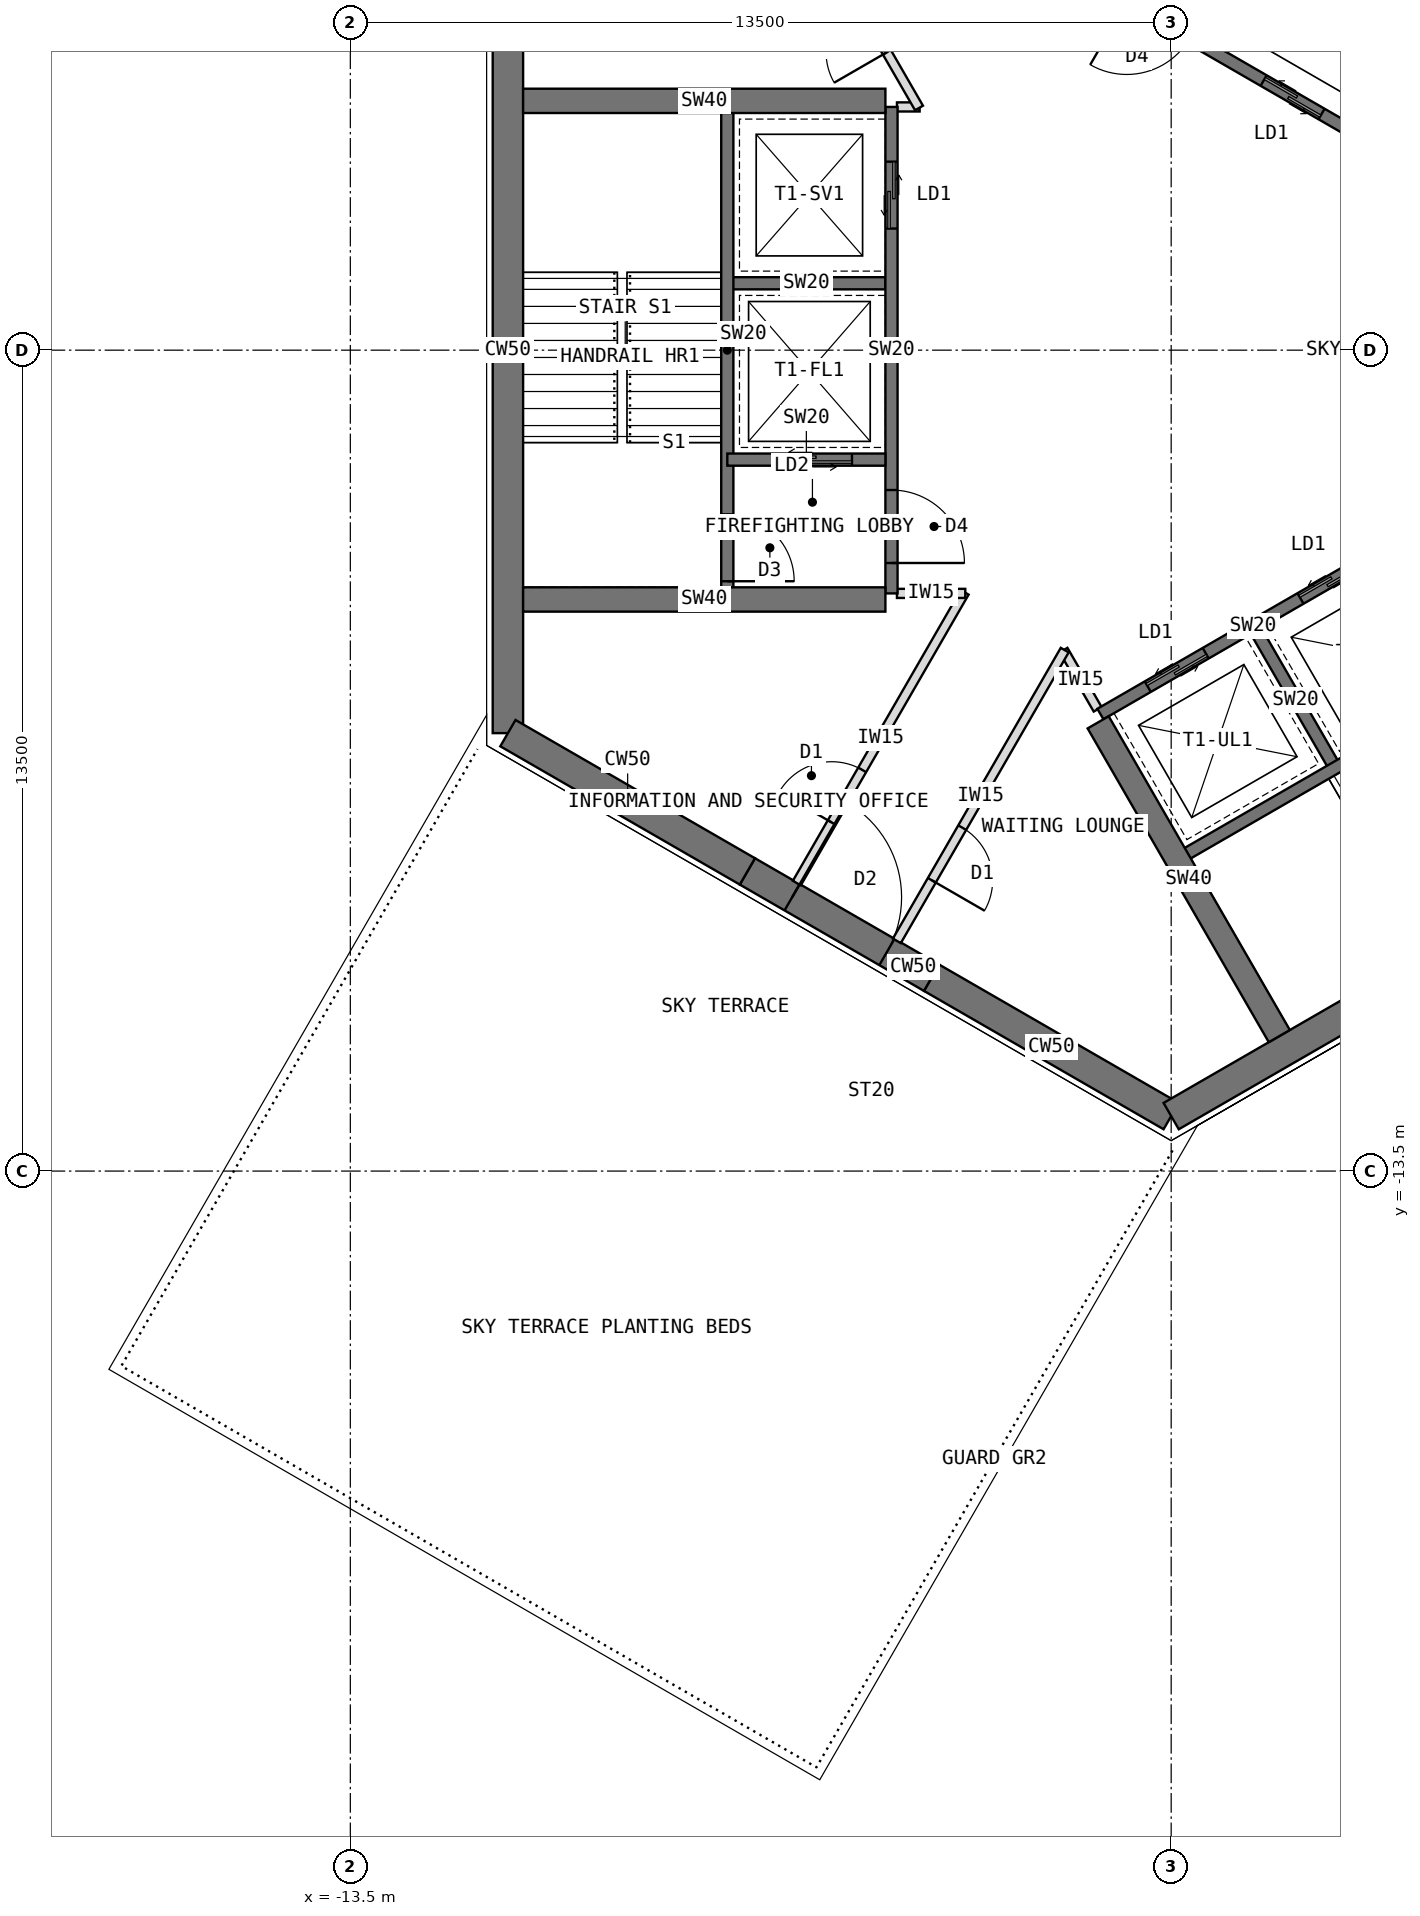
"""IFC4 building model, lengths in metres.
Left out: names, types, materials, properties, quantities, classifications, styles, units other than length and angle.
Written with IfcOpenShell. Run it as: python <this file> out.ifc"""

import sys

from ifc_helpers import new_model, si_unit, direction, frame, frame_2d, origin, place, context, subcontext, project, spatial, rectangle, extrude, element, fill, save


model = new_model("IFC4")
c1 = context("Model", 3, precision=1e-05, world=origin(), true_north=direction((0.0, 1.0)))
c2 = subcontext(c1, "Body", "Model", "MODEL_VIEW")
j1 = project(units=[si_unit("LENGTHUNIT", "METRE"), si_unit("PLANEANGLEUNIT", "RADIAN")], contexts=[c1])
p1 = place(None, origin())
s1 = spatial("IfcSite", under=j1, at=p1, CompositionType="ELEMENT")
p2 = place(p1, origin())
s2 = spatial("IfcBuilding", under=s1, at=p2, CompositionType="ELEMENT")
p3 = place(p2, frame((0.0, 0.0, 170.5)))
s3 = spatial("IfcBuildingStorey", under=s2, at=p3, CompositionType="ELEMENT", Elevation=170.5)
p4 = place(p3, frame((-10.908, 6.298, 0.0), z_axis=(0.0, 0.0, 1.0), x_axis=(0.0, -1.0, 0.0)))
e1 = element("IfcWall", 1, at=p4, inside=s3, PredefinedType="SHEAR", context=c2, shape_type="SweptSolid", body=[
    extrude(rectangle(XDim=12.596, YDim=0.5, at=frame_2d((6.298, 0.0))), origin(), (0.0, 0.0, 1.0), 4.0),
])
p5 = place(p3, frame((-10.908, -6.298, 0.0), z_axis=(0.0, 0.0, 1.0), x_axis=(0.866034513004, -0.499984222037, 0.0)))
e2 = element("IfcWall", 2, at=p5, inside=s3, PredefinedType="SHEAR", context=c2, shape_type="SweptSolid", body=[
    extrude(rectangle(XDim=4.548, YDim=0.5, at=frame_2d((2.274, 0.0))), origin(), (0.0, 0.0, 1.0), 4.0),
])
p6 = place(p3, frame((-6.97, -8.572, 0.0), z_axis=(0.0, 0.0, 1.0), x_axis=(0.866019471182, -0.500010275428, 0.0)))
e3 = element("IfcWall", 3, at=p6, inside=s3, PredefinedType="SHEAR", context=c2, shape_type="SweptSolid", body=[
    extrude(rectangle(XDim=3.5, YDim=0.5, at=frame_2d((1.75, 0.0))), origin(), (0.0, 0.0, 1.0), 4.0),
])
p7 = place(p6, frame((0.85, 0.0, 0.0)))
e4 = element("IfcOpeningElement", 4, at=p7, cuts=e3, PredefinedType="OPENING", context=c2, shape_type="SweptSolid", body=[
    extrude(rectangle(XDim=1.8, YDim=2.1, at=frame_2d((0.9, 1.05))), frame((0.0, 0.26, 0.0), z_axis=(0.0, -1.0, 0.0), x_axis=(1.0, 0.0, 0.0)), (0.0, 0.0, 1.0), 0.52),
])
p8 = place(p3, frame((-3.939, -10.322, 0.0), z_axis=(0.0, 0.0, 1.0), x_axis=(0.866011268655, -0.500024481964, 0.0)))
e5 = element("IfcWall", 5, at=p8, inside=s3, PredefinedType="SHEAR", context=c2, shape_type="SweptSolid", body=[
    extrude(rectangle(XDim=4.548, YDim=0.5, at=frame_2d((2.274, 0.0))), origin(), (0.0, 0.0, 1.0), 4.0),
])
p9 = place(p3, frame((0.0, -12.596, 0.0), z_axis=(0.0, 0.0, 1.0), x_axis=(0.866021940709, 0.500005998175, 0.0)))
e6 = element("IfcWall", 6, at=p9, inside=s3, PredefinedType="SHEAR", context=c2, shape_type="SweptSolid", body=[
    extrude(rectangle(XDim=12.596, YDim=0.5, at=frame_2d((6.298, 0.0))), origin(), (0.0, 0.0, 1.0), 4.0),
])
p10 = place(p3, frame((5.764, 1.984, 0.0), z_axis=(0.0, 0.0, 1.0), x_axis=(-0.866026010844, 0.49999894854, 0.0)))
e7 = element("IfcWall", 7, at=p10, inside=s3, PredefinedType="SHEAR", context=c2, shape_type="SweptSolid", body=[
    extrude(rectangle(XDim=8.0, YDim=0.2, at=frame_2d((4.0, 0.0))), origin(), (0.0, 0.0, 1.0), 4.0),
])
p11 = place(p10, frame((6.3, 0.0, 0.0)))
e8 = element("IfcOpeningElement", 8, at=p11, cuts=e7, PredefinedType="OPENING", context=c2, shape_type="SweptSolid", body=[
    extrude(rectangle(XDim=1.2, YDim=2.1, at=frame_2d((0.6, 1.05))), frame((0.0, 0.11, 0.0), z_axis=(0.0, -1.0, 0.0), x_axis=(1.0, 0.0, 0.0)), (0.0, 0.0, 1.0), 0.22),
])
p12 = place(p10, frame((0.9, 0.0, 0.0)))
e9 = element("IfcOpeningElement", 9, at=p12, cuts=e7, PredefinedType="OPENING", context=c2, shape_type="SweptSolid", body=[
    extrude(rectangle(XDim=1.1, YDim=2.2, at=frame_2d((0.55, 1.1))), frame((0.0, 0.11, 0.0), z_axis=(0.0, -1.0, 0.0), x_axis=(1.0, 0.0, 0.0)), (0.0, 0.0, 1.0), 0.22),
])
p13 = place(p10, frame((3.8, 0.0, 0.0)))
e10 = element("IfcOpeningElement", 10, at=p13, cuts=e7, PredefinedType="OPENING", context=c2, shape_type="SweptSolid", body=[
    extrude(rectangle(XDim=1.1, YDim=2.2, at=frame_2d((0.55, 1.1))), frame((0.0, 0.11, 0.0), z_axis=(0.0, -1.0, 0.0), x_axis=(1.0, 0.0, 0.0)), (0.0, 0.0, 1.0), 0.22),
])
p14 = place(p3, frame((7.114, 4.322, 0.0), z_axis=(0.0, 0.0, 1.0), x_axis=(-0.866026010844, 0.49999894854, 0.0)))
e11 = element("IfcWall", 11, at=p14, inside=s3, PredefinedType="SHEAR", context=c2, shape_type="SweptSolid", body=[
    extrude(rectangle(XDim=8.0, YDim=0.2, at=frame_2d((4.0, 0.0))), origin(), (0.0, 0.0, 1.0), 4.0),
])
p15 = place(p14, frame((6.8, 0.0, 0.0)))
e12 = element("IfcOpeningElement", 12, at=p15, cuts=e11, PredefinedType="OPENING", context=c2, shape_type="SweptSolid", body=[
    extrude(rectangle(XDim=0.9, YDim=2.1, at=frame_2d((0.45, 1.05))), frame((0.0, 0.11, 0.0), z_axis=(0.0, -1.0, 0.0), x_axis=(1.0, 0.0, 0.0)), (0.0, 0.0, 1.0), 0.22),
])
p16 = place(p3, frame((-4.6, 4.0, 0.0), z_axis=(0.0, 0.0, 1.0), x_axis=(0.0, -1.0, 0.0)))
e13 = element("IfcWall", 13, at=p16, inside=s3, PredefinedType="SHEAR", context=c2, shape_type="SweptSolid", body=[
    extrude(rectangle(XDim=8.0, YDim=0.2, at=frame_2d((4.0, 0.0))), origin(), (0.0, 0.0, 1.0), 4.0),
])
p17 = place(p16, frame((6.3, 0.0, 0.0)))
e14 = element("IfcOpeningElement", 14, at=p17, cuts=e13, PredefinedType="OPENING", context=c2, shape_type="SweptSolid", body=[
    extrude(rectangle(XDim=1.2, YDim=2.1, at=frame_2d((0.6, 1.05))), frame((0.0, 0.11, 0.0), z_axis=(0.0, -1.0, 0.0), x_axis=(1.0, 0.0, 0.0)), (0.0, 0.0, 1.0), 0.22),
])
p18 = place(p16, frame((0.9, 0.0, 0.0)))
e15 = element("IfcOpeningElement", 15, at=p18, cuts=e13, PredefinedType="OPENING", context=c2, shape_type="SweptSolid", body=[
    extrude(rectangle(XDim=1.1, YDim=2.2, at=frame_2d((0.55, 1.1))), frame((0.0, 0.11, 0.0), z_axis=(0.0, -1.0, 0.0), x_axis=(1.0, 0.0, 0.0)), (0.0, 0.0, 1.0), 0.22),
])
p19 = place(p3, frame((-4.7, 1.1, 0.0), z_axis=(0.0, 0.0, 1.0), x_axis=(-1.0, 0.0, 0.0)))
e16 = element("IfcWall", 16, at=p19, inside=s3, PredefinedType="SHEAR", context=c2, shape_type="SweptSolid", body=[
    extrude(rectangle(XDim=2.6, YDim=0.2, at=frame_2d((1.3, 0.0))), origin(), (0.0, 0.0, 1.0), 4.0),
])
p20 = place(p3, frame((-4.7, -1.8, 0.0), z_axis=(0.0, 0.0, 1.0), x_axis=(-1.0, 0.0, 0.0)))
e17 = element("IfcWall", 17, at=p20, inside=s3, PredefinedType="SHEAR", context=c2, shape_type="SweptSolid", body=[
    extrude(rectangle(XDim=2.6, YDim=0.2, at=frame_2d((1.3, 0.0))), origin(), (0.0, 0.0, 1.0), 4.0),
])
p21 = place(p20, frame((0.55, 0.0, 0.0)))
e18 = element("IfcOpeningElement", 18, at=p21, cuts=e17, PredefinedType="OPENING", context=c2, shape_type="SweptSolid", body=[
    extrude(rectangle(XDim=1.3, YDim=2.2, at=frame_2d((0.65, 1.1))), frame((0.0, 0.11, 0.0), z_axis=(0.0, -1.0, 0.0), x_axis=(1.0, 0.0, 0.0)), (0.0, 0.0, 1.0), 0.22),
])
p22 = place(p3, frame((-7.3, 4.0, 0.0), z_axis=(0.0, 0.0, 1.0), x_axis=(0.0, -1.0, 0.0)))
e19 = element("IfcWall", 19, at=p22, inside=s3, PredefinedType="SHEAR", context=c2, shape_type="SweptSolid", body=[
    extrude(rectangle(XDim=8.0, YDim=0.2, at=frame_2d((4.0, 0.0))), origin(), (0.0, 0.0, 1.0), 4.0),
])
p23 = place(p22, frame((6.7, 0.0, 0.0)))
e20 = element("IfcOpeningElement", 20, at=p23, cuts=e19, PredefinedType="OPENING", context=c2, shape_type="SweptSolid", body=[
    extrude(rectangle(XDim=1.1, YDim=2.1, at=frame_2d((0.55, 1.05))), frame((0.0, 0.11, 0.0), z_axis=(0.0, -1.0, 0.0), x_axis=(1.0, 0.0, 0.0)), (0.0, 0.0, 1.0), 0.22),
])
for number, where, z_axis, x_axis in (
    (21, (-4.7, -4.1, 0.0), (0.0, 0.0, 1.0), (-1.0, 0.0, 0.0)),
    (22, (-4.7, 4.1, 0.0), (0.0, 0.0, 1.0), (-1.0, 0.0, 0.0)),
):
    element("IfcWall", number, at=place(p3, frame(where, z_axis=z_axis, x_axis=x_axis)), inside=s3, PredefinedType="SHEAR", context=c2, shape_type="SweptSolid", body=[
        extrude(rectangle(XDim=5.958, YDim=0.4, at=frame_2d((2.979, 0.0))), origin(), (0.0, 0.0, 1.0), 4.0),
    ])
p24 = place(p3, frame((-1.164, -5.984, 0.0), z_axis=(0.0, 0.0, 1.0), x_axis=(0.866026010844, 0.49999894854, 0.0)))
e23 = element("IfcWall", 23, at=p24, inside=s3, PredefinedType="SHEAR", context=c2, shape_type="SweptSolid", body=[
    extrude(rectangle(XDim=8.0, YDim=0.2, at=frame_2d((4.0, 0.0))), origin(), (0.0, 0.0, 1.0), 4.0),
])
p25 = place(p24, frame((6.3, 0.0, 0.0)))
e24 = element("IfcOpeningElement", 24, at=p25, cuts=e23, PredefinedType="OPENING", context=c2, shape_type="SweptSolid", body=[
    extrude(rectangle(XDim=1.2, YDim=2.1, at=frame_2d((0.6, 1.05))), frame((0.0, 0.11, 0.0), z_axis=(0.0, -1.0, 0.0), x_axis=(1.0, 0.0, 0.0)), (0.0, 0.0, 1.0), 0.22),
])
p26 = place(p24, frame((0.9, 0.0, 0.0)))
e25 = element("IfcOpeningElement", 25, at=p26, cuts=e23, PredefinedType="OPENING", context=c2, shape_type="SweptSolid", body=[
    extrude(rectangle(XDim=1.1, YDim=2.2, at=frame_2d((0.55, 1.1))), frame((0.0, 0.11, 0.0), z_axis=(0.0, -1.0, 0.0), x_axis=(1.0, 0.0, 0.0)), (0.0, 0.0, 1.0), 0.22),
])
p27 = place(p24, frame((3.8, 0.0, 0.0)))
e26 = element("IfcOpeningElement", 26, at=p27, cuts=e23, PredefinedType="OPENING", context=c2, shape_type="SweptSolid", body=[
    extrude(rectangle(XDim=1.1, YDim=2.2, at=frame_2d((0.55, 1.1))), frame((0.0, 0.11, 0.0), z_axis=(0.0, -1.0, 0.0), x_axis=(1.0, 0.0, 0.0)), (0.0, 0.0, 1.0), 0.22),
])
p28 = place(p3, frame((1.397, -4.62, 0.0), z_axis=(0.0, 0.0, 1.0), x_axis=(0.499936506574, -0.866062058628, 0.0)))
e27 = element("IfcWall", 27, at=p28, inside=s3, PredefinedType="SHEAR", context=c2, shape_type="SweptSolid", body=[
    extrude(rectangle(XDim=2.6, YDim=0.2, at=frame_2d((1.3, 0.0))), origin(), (0.0, 0.0, 1.0), 4.0),
])
p29 = place(p3, frame((0.186, -8.322, 0.0), z_axis=(0.0, 0.0, 1.0), x_axis=(0.866026010844, 0.49999894854, 0.0)))
e28 = element("IfcWall", 28, at=p29, inside=s3, PredefinedType="SHEAR", context=c2, shape_type="SweptSolid", body=[
    extrude(rectangle(XDim=8.0, YDim=0.2, at=frame_2d((4.0, 0.0))), origin(), (0.0, 0.0, 1.0), 4.0),
])
p30 = place(p29, frame((6.7, 0.0, 0.0)))
e29 = element("IfcOpeningElement", 29, at=p30, cuts=e28, PredefinedType="OPENING", context=c2, shape_type="SweptSolid", body=[
    extrude(rectangle(XDim=1.1, YDim=2.1, at=frame_2d((0.55, 1.05))), frame((0.0, 0.11, 0.0), z_axis=(0.0, -1.0, 0.0), x_axis=(1.0, 0.0, 0.0)), (0.0, 0.0, 1.0), 0.22),
])
p31 = place(p3, frame((-1.201, -6.12, 0.0), z_axis=(0.0, 0.0, 1.0), x_axis=(0.500021575205, -0.866012946976, 0.0)))
e30 = element("IfcWall", 30, at=p31, inside=s3, PredefinedType="SHEAR", context=c2, shape_type="SweptSolid", body=[
    extrude(rectangle(XDim=5.958, YDim=0.4, at=frame_2d((2.979, 0.0))), origin(), (0.0, 0.0, 1.0), 4.0),
])
p32 = place(p3, frame((-1.209, -5.906, 0.0), z_axis=(0.0, 0.0, 1.0), x_axis=(-0.500111091428, 0.865961255618, 0.0)))
e31 = element("IfcWall", 31, at=p32, inside=s3, PredefinedType="PARTITIONING", context=c2, shape_type="SweptSolid", body=[
    extrude(rectangle(XDim=1.124, YDim=0.15, at=frame_2d((0.562, 0.0))), origin(), (0.0, 0.0, 1.0), 3.8),
])
p33 = place(p3, frame((-1.751, -4.933, 0.0), z_axis=(0.0, 0.0, 1.0), x_axis=(-0.499986567624, -0.866033158832, 0.0)))
e32 = element("IfcWall", 32, at=p33, inside=s3, PredefinedType="PARTITIONING", context=c2, shape_type="SweptSolid", body=[
    extrude(rectangle(XDim=5.521, YDim=0.15, at=frame_2d((2.761, 0.0))), origin(), (0.0, 0.0, 1.0), 3.8),
])
p34 = place(p33, frame((3.371, 0.0, 0.0)))
e33 = element("IfcOpeningElement", 33, at=p34, cuts=e32, PredefinedType="OPENING", context=c2, shape_type="SweptSolid", body=[
    extrude(rectangle(XDim=1.0, YDim=2.1, at=frame_2d((0.5, 1.05))), frame((0.0, 0.085, 0.0), z_axis=(0.0, -1.0, 0.0), x_axis=(1.0, 0.0, 0.0)), (0.0, 0.0, 1.0), 0.17),
])
p35 = place(p3, frame((-6.157, -8.764, 0.0), z_axis=(0.0, 0.0, 1.0), x_axis=(0.50000571537, 0.866022103989, 0.0)))
e34 = element("IfcWall", 34, at=p35, inside=s3, PredefinedType="PARTITIONING", context=c2, shape_type="SweptSolid", body=[
    extrude(rectangle(XDim=5.521, YDim=0.15, at=frame_2d((2.76, 0.0))), origin(), (0.0, 0.0, 1.0), 3.8),
])
p36 = place(p35, frame((1.15, 0.0, 0.0)))
e35 = element("IfcOpeningElement", 35, at=p36, cuts=e34, PredefinedType="OPENING", context=c2, shape_type="SweptSolid", body=[
    extrude(rectangle(XDim=1.0, YDim=2.1, at=frame_2d((0.5, 1.05))), frame((0.0, 0.085, 0.0), z_axis=(0.0, -1.0, 0.0), x_axis=(1.0, 0.0, 0.0)), (0.0, 0.0, 1.0), 0.17),
])
p37 = place(p3, frame((-3.386, -4.0, 0.0), z_axis=(0.0, 0.0, 1.0), x_axis=(-1.0, 0.0, 0.0)))
e36 = element("IfcWall", 36, at=p37, inside=s3, PredefinedType="PARTITIONING", context=c2, shape_type="SweptSolid", body=[
    extrude(rectangle(XDim=1.124, YDim=0.15, at=frame_2d((0.562, 0.0))), origin(), (0.0, 0.0, 1.0), 3.8),
])
p38 = place(p3, frame((-4.51, 4.0, 0.0), z_axis=(0.0, 0.0, 1.0), x_axis=(1.0, 0.0, 0.0)))
e37 = element("IfcWall", 37, at=p38, inside=s3, PredefinedType="PARTITIONING", context=c2, shape_type="SweptSolid", body=[
    extrude(rectangle(XDim=0.373, YDim=0.15, at=frame_2d((0.187, 0.0))), origin(), (0.0, 0.0, 1.0), 3.8),
])
p39 = place(p3, frame((-4.147, 3.983, 0.0), z_axis=(0.0, 0.0, 1.0), x_axis=(-0.499986674824, 0.866033096941, 0.0)))
e38 = element("IfcWall", 38, at=p39, inside=s3, PredefinedType="PARTITIONING", context=c2, shape_type="SweptSolid", body=[
    extrude(rectangle(XDim=5.146, YDim=0.15, at=frame_2d((2.573, 0.0))), origin(), (0.0, 0.0, 1.0), 3.8),
])
p40 = place(p39, frame((1.058, 0.0, 0.0)))
e39 = element("IfcOpeningElement", 39, at=p40, cuts=e38, PredefinedType="OPENING", context=c2, shape_type="SweptSolid", body=[
    extrude(rectangle(XDim=1.0, YDim=2.1, at=frame_2d((0.5, 1.05))), frame((0.0, 0.085, 0.0), z_axis=(0.0, -1.0, 0.0), x_axis=(1.0, 0.0, 0.0)), (0.0, 0.0, 1.0), 0.17),
])
p41 = place(p13, origin())
e40 = element("IfcDoor", 40, at=p41, inside=s3, OperationType="DOUBLE_DOOR_SLIDING", PredefinedType="DOOR", context=c2, shape_type="SweptSolid", body=[
    extrude(rectangle(XDim=1.1, YDim=2.2, at=frame_2d((0.55, 1.1))), frame((0.0, 0.025, 0.0), z_axis=(0.0, -1.0, 0.0), x_axis=(1.0, 0.0, 0.0)), (0.0, 0.0, 1.0), 0.05),
])
fill(e10, e40)
p42 = place(p17, origin())
e41 = element("IfcDoor", 41, at=p42, inside=s3, OperationType="SINGLE_SWING_RIGHT", PredefinedType="DOOR", context=c2, shape_type="SweptSolid", body=[
    extrude(rectangle(XDim=1.2, YDim=2.1, at=frame_2d((0.6, 1.05))), frame((0.0, 0.025, 0.0), z_axis=(0.0, -1.0, 0.0), x_axis=(1.0, 0.0, 0.0)), (0.0, 0.0, 1.0), 0.05),
])
fill(e14, e41)
p43 = place(p21, origin())
e42 = element("IfcDoor", 42, at=p43, inside=s3, OperationType="DOUBLE_DOOR_SLIDING", PredefinedType="DOOR", context=c2, shape_type="SweptSolid", body=[
    extrude(rectangle(XDim=1.3, YDim=2.2, at=frame_2d((0.65, 1.1))), frame((0.0, 0.025, 0.0), z_axis=(0.0, -1.0, 0.0), x_axis=(1.0, 0.0, 0.0)), (0.0, 0.0, 1.0), 0.05),
])
fill(e18, e42)
p44 = place(p18, origin())
e43 = element("IfcDoor", 43, at=p44, inside=s3, OperationType="DOUBLE_DOOR_SLIDING", PredefinedType="DOOR", context=c2, shape_type="SweptSolid", body=[
    extrude(rectangle(XDim=1.1, YDim=2.2, at=frame_2d((0.55, 1.1))), frame((0.0, 0.025, 0.0), z_axis=(0.0, -1.0, 0.0), x_axis=(1.0, 0.0, 0.0)), (0.0, 0.0, 1.0), 0.05),
])
fill(e15, e43)
p45 = place(p23, origin())
e44 = element("IfcDoor", 44, at=p45, inside=s3, OperationType="SINGLE_SWING_RIGHT", PredefinedType="DOOR", context=c2, shape_type="SweptSolid", body=[
    extrude(rectangle(XDim=1.1, YDim=2.1, at=frame_2d((0.55, 1.05))), frame((0.0, 0.025, 0.0), z_axis=(0.0, -1.0, 0.0), x_axis=(1.0, 0.0, 0.0)), (0.0, 0.0, 1.0), 0.05),
])
fill(e20, e44)
p46 = place(p26, origin())
e45 = element("IfcDoor", 45, at=p46, inside=s3, OperationType="DOUBLE_DOOR_SLIDING", PredefinedType="DOOR", context=c2, shape_type="SweptSolid", body=[
    extrude(rectangle(XDim=1.1, YDim=2.2, at=frame_2d((0.55, 1.1))), frame((0.0, 0.025, 0.0), z_axis=(0.0, -1.0, 0.0), x_axis=(1.0, 0.0, 0.0)), (0.0, 0.0, 1.0), 0.05),
])
fill(e25, e45)
p47 = place(p27, origin())
e46 = element("IfcDoor", 46, at=p47, inside=s3, OperationType="DOUBLE_DOOR_SLIDING", PredefinedType="DOOR", context=c2, shape_type="SweptSolid", body=[
    extrude(rectangle(XDim=1.1, YDim=2.2, at=frame_2d((0.55, 1.1))), frame((0.0, 0.025, 0.0), z_axis=(0.0, -1.0, 0.0), x_axis=(1.0, 0.0, 0.0)), (0.0, 0.0, 1.0), 0.05),
])
fill(e26, e46)
p48 = place(p7, origin())
e47 = element("IfcDoor", 47, at=p48, inside=s3, OperationType="DOUBLE_DOOR_DOUBLE_SWING", PredefinedType="DOOR", context=c2, shape_type="SweptSolid", body=[
    extrude(rectangle(XDim=1.8, YDim=2.1, at=frame_2d((0.9, 1.05))), frame((0.0, 0.025, 0.0), z_axis=(0.0, -1.0, 0.0), x_axis=(1.0, 0.0, 0.0)), (0.0, 0.0, 1.0), 0.05),
])
fill(e4, e47)
p49 = place(p36, origin())
e48 = element("IfcDoor", 48, at=p49, inside=s3, OperationType="SINGLE_SWING_LEFT", PredefinedType="DOOR", context=c2, shape_type="SweptSolid", body=[
    extrude(rectangle(XDim=1.0, YDim=2.1, at=frame_2d((0.5, 1.05))), frame((0.0, 0.025, 0.0), z_axis=(0.0, -1.0, 0.0), x_axis=(1.0, 0.0, 0.0)), (0.0, 0.0, 1.0), 0.05),
])
fill(e35, e48)
p50 = place(p34, origin())
e49 = element("IfcDoor", 49, at=p50, inside=s3, OperationType="SINGLE_SWING_RIGHT", PredefinedType="DOOR", context=c2, shape_type="SweptSolid", body=[
    extrude(rectangle(XDim=1.0, YDim=2.1, at=frame_2d((0.5, 1.05))), frame((0.0, 0.025, 0.0), z_axis=(0.0, -1.0, 0.0), x_axis=(1.0, 0.0, 0.0)), (0.0, 0.0, 1.0), 0.05),
])
fill(e33, e49)
p51 = place(p40, origin())
e50 = element("IfcDoor", 50, at=p51, inside=s3, OperationType="SINGLE_SWING_LEFT", PredefinedType="DOOR", context=c2, shape_type="SweptSolid", body=[
    extrude(rectangle(XDim=1.0, YDim=2.1, at=frame_2d((0.5, 1.05))), frame((0.0, 0.025, 0.0), z_axis=(0.0, -1.0, 0.0), x_axis=(1.0, 0.0, 0.0)), (0.0, 0.0, 1.0), 0.05),
])
fill(e39, e50)
save(model, sys.argv[1])
